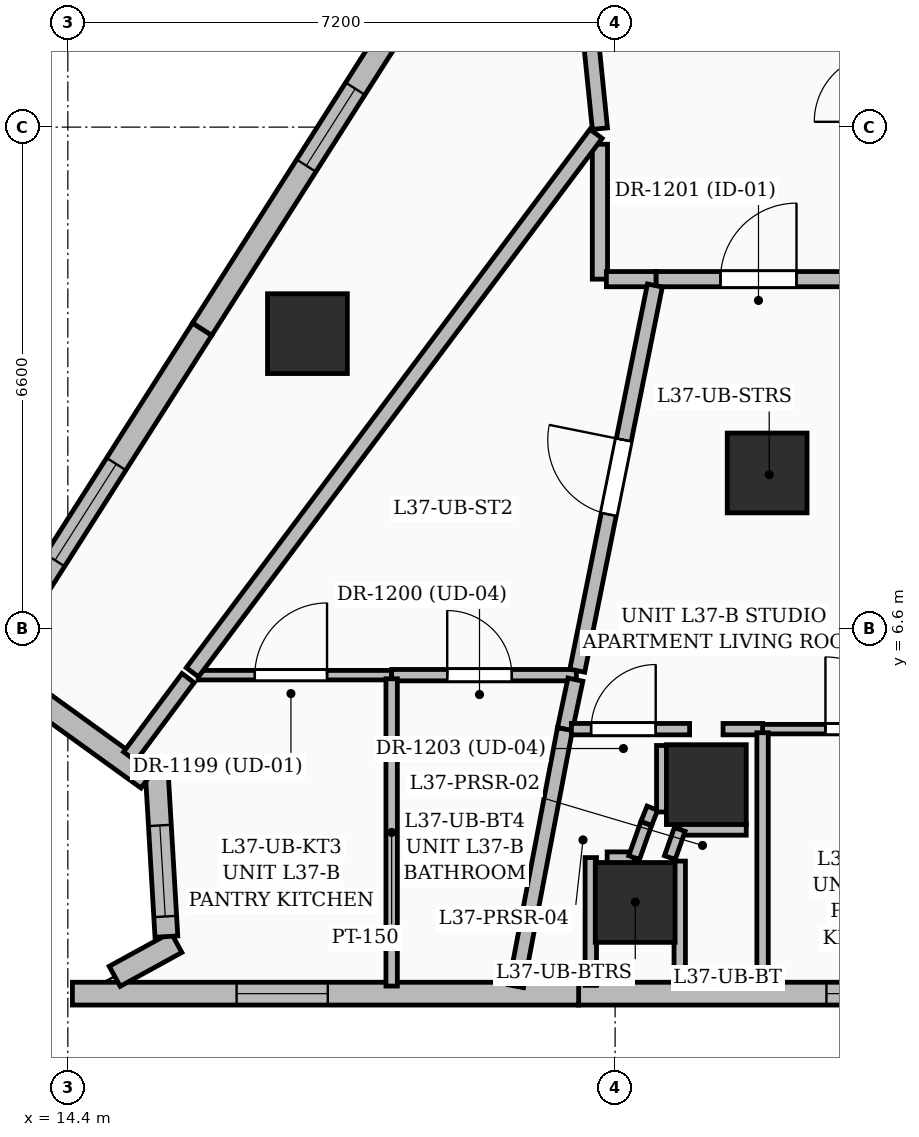
"""IFC4 building model, lengths in metres.
Left out: names, types, materials, properties, quantities, classifications, styles, units other than length and angle.
Written with IfcOpenShell. Run it as: python <this file> out.ifc"""

import sys

from ifc_helpers import new_model, si_unit, direction, frame, frame_2d, origin, origin_2d, place, context, subcontext, project, spatial, rectangle, extrude, element, fill, save


model = new_model("IFC4")
c1 = context("Model", 3, precision=1e-05, world=origin(), true_north=direction((0.0, 1.0)))
c2 = subcontext(c1, "Body", "Model", "MODEL_VIEW")
j1 = project(units=[si_unit("LENGTHUNIT", "METRE"), si_unit("PLANEANGLEUNIT", "RADIAN")], contexts=[c1])
p1 = place(None, origin())
s1 = spatial("IfcSite", under=j1, at=p1, CompositionType="ELEMENT")
p2 = place(p1, origin())
s2 = spatial("IfcBuilding", under=s1, at=p2, CompositionType="ELEMENT")
p3 = place(p2, frame((0.0, 0.0, 146.4)))
s3 = spatial("IfcBuildingStorey", under=s2, at=p3, CompositionType="ELEMENT", Elevation=146.4)
for number, where, z_axis, x_axis in (
    (1, (22.8, 4.55, 0.0), (0.0, 0.0, 1.0), (1.0, 0.0, 0.0)),
    (2, (23.6, 8.65, 0.0), (0.0, 0.0, 1.0), (1.0, 0.0, 0.0)),
    (3, (21.864, 3.0, 0.0), (0.0, 0.0, 1.0), (1.0, 0.0, 0.0)),
    (4, (17.552, 10.483, 0.0), (0.0, 0.0, 1.0), (1.0, 0.0, 0.0)),
):
    element("IfcColumn", number, at=place(p3, frame(where, z_axis=z_axis, x_axis=x_axis)), inside=s3, PredefinedType="COLUMN", context=c2, shape_type="SweptSolid", body=[
        extrude(rectangle(XDim=1.05, YDim=1.05, at=origin_2d()), origin(), (0.0, 0.0, 1.0), 3.6),
    ])
p4 = place(p3, frame((27.78, 1.8, 0.0), z_axis=(0.0, 0.0, 1.0), x_axis=(-1.0, 0.0, 0.0)))
e5 = element("IfcWall", 5, at=p4, inside=s3, PredefinedType="SOLIDWALL", context=c2, shape_type="SweptSolid", body=[
    extrude(rectangle(XDim=6.66, YDim=0.3, at=frame_2d((3.33, 0.0))), origin(), (0.0, 0.0, 1.0), 3.35),
])
p5 = place(p4, frame((1.9, 0.0, 0.6)))
e6 = element("IfcOpeningElement", 6, at=p5, cuts=e5, PredefinedType="OPENING", context=c2, shape_type="SweptSolid", body=[
    extrude(rectangle(XDim=1.5, YDim=2.1, at=frame_2d((0.75, 1.05))), frame((0.0, 0.16, 0.0), z_axis=(0.0, -1.0, 0.0), x_axis=(1.0, 0.0, 0.0)), (0.0, 0.0, 1.0), 0.32),
])
p6 = place(p3, frame((21.12, 1.8, 0.0), z_axis=(0.0, 0.0, 1.0), x_axis=(-1.0, 0.0, 0.0)))
e7 = element("IfcWall", 7, at=p6, inside=s3, PredefinedType="SOLIDWALL", context=c2, shape_type="SweptSolid", body=[
    extrude(rectangle(XDim=6.66, YDim=0.3, at=frame_2d((3.33, 0.0))), origin(), (0.0, 0.0, 1.0), 3.35),
])
p7 = place(p6, frame((3.3, 0.0, 0.8)))
e8 = element("IfcOpeningElement", 8, at=p7, cuts=e7, PredefinedType="OPENING", context=c2, shape_type="SweptSolid", body=[
    extrude(rectangle(XDim=1.2, YDim=1.8, at=frame_2d((0.6, 0.9))), frame((0.0, 0.16, 0.0), z_axis=(0.0, -1.0, 0.0), x_axis=(1.0, 0.0, 0.0)), (0.0, 0.0, 1.0), 0.32),
])
p8 = place(p3, frame((15.016, 2.028, 0.0), z_axis=(0.0, 0.0, 1.0), x_axis=(0.876794471231, 0.48086531921, 0.0)))
e9 = element("IfcWall", 9, at=p8, inside=s3, PredefinedType="SOLIDWALL", context=c2, shape_type="SweptSolid", body=[
    extrude(rectangle(XDim=0.926, YDim=0.3, at=frame_2d((0.463, 0.0))), origin(), (0.0, 0.0, 1.0), 3.35),
])
p9 = place(p3, frame((15.697, 2.551, 0.0), z_axis=(0.0, 0.0, 1.0), x_axis=(-0.058688358982, 0.99827635278, 0.0)))
e10 = element("IfcWall", 10, at=p9, inside=s3, PredefinedType="SOLIDWALL", context=c2, shape_type="SweptSolid", body=[
    extrude(rectangle(XDim=2.126, YDim=0.3, at=frame_2d((1.063, 0.0))), origin(), (0.0, 0.0, 1.0), 3.35),
])
p10 = place(p9, frame((0.265, 0.0, 0.8)))
e11 = element("IfcOpeningElement", 11, at=p10, cuts=e10, PredefinedType="OPENING", context=c2, shape_type="SweptSolid", body=[
    extrude(rectangle(XDim=1.2, YDim=1.8, at=frame_2d((0.6, 0.9))), frame((0.0, 0.16, 0.0), z_axis=(0.0, -1.0, 0.0), x_axis=(1.0, 0.0, 0.0)), (0.0, 0.0, 1.0), 0.32),
])
p11 = place(p3, frame((15.45, 4.627, 0.0), z_axis=(0.0, 0.0, 1.0), x_axis=(-0.810712787228, 0.585444084969, 0.0)))
e12 = element("IfcWall", 12, at=p11, inside=s3, PredefinedType="SOLIDWALL", context=c2, shape_type="SweptSolid", body=[
    extrude(rectangle(XDim=2.11, YDim=0.3, at=frame_2d((1.055, 0.0))), origin(), (0.0, 0.0, 1.0), 3.35),
])
p12 = place(p3, frame((13.007, 5.579, 0.0), z_axis=(0.0, 0.0, 1.0), x_axis=(0.537103674191, 0.843516237645, 0.0)))
e13 = element("IfcWall", 13, at=p12, inside=s3, PredefinedType="SOLIDWALL", context=c2, shape_type="SweptSolid", body=[
    extrude(rectangle(XDim=5.884, YDim=0.3, at=frame_2d((2.942, 0.0))), origin(), (0.0, 0.0, 1.0), 3.35),
])
p13 = place(p12, frame((2.28, 0.0, 0.6)))
e14 = element("IfcOpeningElement", 14, at=p13, cuts=e13, PredefinedType="OPENING", context=c2, shape_type="SweptSolid", body=[
    extrude(rectangle(XDim=1.5, YDim=2.1, at=frame_2d((0.75, 1.05))), frame((0.0, 0.16, 0.0), z_axis=(0.0, -1.0, 0.0), x_axis=(1.0, 0.0, 0.0)), (0.0, 0.0, 1.0), 0.32),
])
p14 = place(p3, frame((16.167, 10.542, 0.0), z_axis=(0.0, 0.0, 1.0), x_axis=(0.537089204025, 0.843525451258, 0.0)))
e15 = element("IfcWall", 15, at=p14, inside=s3, PredefinedType="SOLIDWALL", context=c2, shape_type="SweptSolid", body=[
    extrude(rectangle(XDim=6.504, YDim=0.3, at=frame_2d((3.252, 0.0))), origin(), (0.0, 0.0, 1.0), 3.35),
])
p15 = place(p14, frame((2.55, 0.0, 0.8)))
e16 = element("IfcOpeningElement", 16, at=p15, cuts=e15, PredefinedType="OPENING", context=c2, shape_type="SweptSolid", body=[
    extrude(rectangle(XDim=1.2, YDim=1.8, at=frame_2d((0.6, 0.9))), frame((0.0, 0.16, 0.0), z_axis=(0.0, -1.0, 0.0), x_axis=(1.0, 0.0, 0.0)), (0.0, 0.0, 1.0), 0.32),
])
p16 = place(p3, frame((21.4, 12.975, 0.0), z_axis=(0.0, 0.0, 1.0), x_axis=(0.0, -1.0, 0.0)))
e17 = element("IfcWall", 17, at=p16, inside=s3, PredefinedType="PARTITIONING", context=c2, shape_type="SweptSolid", body=[
    extrude(rectangle(XDim=1.775, YDim=0.2, at=frame_2d((0.888, 0.0))), origin(), (0.0, 0.0, 1.0), 3.35),
])
p17 = place(p3, frame((21.485, 11.2, 0.0), z_axis=(0.0, 0.0, 1.0), x_axis=(1.0, 0.0, 0.0)))
e18 = element("IfcWall", 18, at=p17, inside=s3, PredefinedType="PARTITIONING", context=c2, shape_type="SweptSolid", body=[
    extrude(rectangle(XDim=0.655, YDim=0.2, at=frame_2d((0.327, 0.0))), origin(), (0.0, 0.0, 1.0), 2.787),
])
p18 = place(p3, frame((22.14, 11.2, 0.0), z_axis=(0.0, 0.0, 1.0), x_axis=(1.0, 0.0, 0.0)))
e19 = element("IfcWall", 19, at=p18, inside=s3, PredefinedType="PARTITIONING", context=c2, shape_type="SweptSolid", body=[
    extrude(rectangle(XDim=2.729, YDim=0.2, at=frame_2d((1.365, 0.0))), origin(), (0.0, 0.0, 1.0), 3.35),
])
p19 = place(p18, frame((0.846, 0.0, 0.0)))
e20 = element("IfcOpeningElement", 20, at=p19, cuts=e19, PredefinedType="OPENING", context=c2, shape_type="SweptSolid", body=[
    extrude(rectangle(XDim=1.0, YDim=2.2, at=frame_2d((0.5, 1.1))), frame((0.0, 0.11, 0.0), z_axis=(0.0, -1.0, 0.0), x_axis=(1.0, 0.0, 0.0)), (0.0, 0.0, 1.0), 0.22),
])
p20 = place(p3, frame((20.938, 17.744, 0.0), z_axis=(0.0, 0.0, 1.0), x_axis=(0.100694538304, -0.994917388508, 0.0)))
e21 = element("IfcWall", 21, at=p20, inside=s3, PredefinedType="PARTITIONING", context=c2, shape_type="SweptSolid", body=[
    extrude(rectangle(XDim=4.587, YDim=0.2, at=frame_2d((2.293, 0.0))), origin(), (0.0, 0.0, 1.0), 2.57),
])
p21 = place(p3, frame((16.115, 5.99, 0.0), z_axis=(0.0, 0.0, 1.0), x_axis=(1.0, 0.0, 0.0)))
e22 = element("IfcWall", 22, at=p21, inside=s3, PredefinedType="PARTITIONING", context=c2, shape_type="SweptSolid", body=[
    extrude(rectangle(XDim=2.545, YDim=0.125, at=frame_2d((1.272, 0.0))), origin(), (0.0, 0.0, 1.0), 3.35),
])
p22 = place(p21, frame((0.745, 0.0, 0.0)))
e23 = element("IfcOpeningElement", 23, at=p22, cuts=e22, PredefinedType="OPENING", context=c2, shape_type="SweptSolid", body=[
    extrude(rectangle(XDim=0.95, YDim=2.2, at=frame_2d((0.475, 1.1))), frame((0.0, 0.072, 0.0), z_axis=(0.0, -1.0, 0.0), x_axis=(1.0, 0.0, 0.0)), (0.0, 0.0, 1.0), 0.145),
])
p23 = place(p3, frame((18.66, 5.99, 0.0), z_axis=(0.0, 0.0, 1.0), x_axis=(1.0, 0.0, 0.0)))
e24 = element("IfcWall", 24, at=p23, inside=s3, PredefinedType="PARTITIONING", context=c2, shape_type="SweptSolid", body=[
    extrude(rectangle(XDim=2.43, YDim=0.15, at=frame_2d((1.215, 0.0))), origin(), (0.0, 0.0, 1.0), 2.57),
])
p24 = place(p23, frame((0.731, 0.0, 0.0)))
e25 = element("IfcOpeningElement", 25, at=p24, cuts=e24, PredefinedType="OPENING", context=c2, shape_type="SweptSolid", body=[
    extrude(rectangle(XDim=0.85, YDim=2.1, at=frame_2d((0.425, 1.05))), frame((0.0, 0.085, 0.0), z_axis=(0.0, -1.0, 0.0), x_axis=(1.0, 0.0, 0.0)), (0.0, 0.0, 1.0), 0.17),
])
p25 = place(p3, frame((21.102, 6.049, 0.0), z_axis=(0.0, 0.0, 1.0), x_axis=(0.197587137943, 0.9802853273, 0.0)))
e26 = element("IfcWall", 26, at=p25, inside=s3, PredefinedType="PARTITIONING", context=c2, shape_type="SweptSolid", body=[
    extrude(rectangle(XDim=5.17, YDim=0.2, at=frame_2d((2.585, 0.0))), origin(), (0.0, 0.0, 1.0), 2.393),
])
p26 = place(p25, frame((2.097, 0.0, 0.0)))
e27 = element("IfcOpeningElement", 27, at=p26, cuts=e26, PredefinedType="OPENING", context=c2, shape_type="SweptSolid", body=[
    extrude(rectangle(XDim=1.0, YDim=2.2, at=frame_2d((0.5, 1.1))), frame((0.0, 0.11, 0.0), z_axis=(0.0, -1.0, 0.0), x_axis=(1.0, 0.0, 0.0)), (0.0, 0.0, 1.0), 0.22),
])
p27 = place(p3, frame((21.349, 13.112, 0.0), z_axis=(0.0, 0.0, 1.0), x_axis=(-0.599823501839, -0.800132343204, 0.0)))
e28 = element("IfcWall", 28, at=p27, inside=s3, PredefinedType="PARTITIONING", context=c2, shape_type="SweptSolid", body=[
    extrude(rectangle(XDim=8.854, YDim=0.2, at=frame_2d((4.427, 0.0))), origin(), (0.0, 0.0, 1.0), 2.393),
])
p28 = place(p3, frame((18.66, 1.9, 0.0), z_axis=(0.0, 0.0, 1.0), x_axis=(0.0, 1.0, 0.0)))
e29 = element("IfcWall", 29, at=p28, inside=s3, PredefinedType="PARTITIONING", context=c2, shape_type="SweptSolid", body=[
    extrude(rectangle(XDim=4.042, YDim=0.15, at=frame_2d((2.021, 0.0))), origin(), (0.0, 0.0, 1.0), 3.35),
])
p29 = place(p3, frame((15.982, 5.952, 0.0), z_axis=(0.0, 0.0, 1.0), x_axis=(-0.597169955074, -0.802114732913, 0.0)))
e30 = element("IfcWall", 30, at=p29, inside=s3, PredefinedType="PARTITIONING", context=c2, shape_type="SweptSolid", body=[
    extrude(rectangle(XDim=1.285, YDim=0.2, at=frame_2d((0.643, 0.0))), origin(), (0.0, 0.0, 1.0), 3.35),
])
p30 = place(p3, frame((20.94, 5.28, 0.0), z_axis=(0.0, 0.0, 1.0), x_axis=(0.206823588426, 0.978378251634, 0.0)))
e31 = element("IfcWall", 31, at=p30, inside=s3, PredefinedType="PARTITIONING", context=c2, shape_type="SweptSolid", body=[
    extrude(rectangle(XDim=0.666, YDim=0.2, at=frame_2d((0.333, 0.0))), origin(), (0.0, 0.0, 1.0), 3.35),
])
p31 = place(p3, frame((20.296, 1.898, 0.0), z_axis=(0.0, 0.0, 1.0), x_axis=(0.187066487998, 0.982347254828, 0.0)))
e32 = element("IfcWall", 32, at=p31, inside=s3, PredefinedType="PARTITIONING", context=c2, shape_type="SweptSolid", body=[
    extrude(rectangle(XDim=3.443, YDim=0.2, at=frame_2d((1.721, 0.0))), origin(), (0.0, 0.0, 1.0), 2.57),
])
p32 = place(p3, frame((23.54, 5.28, 0.0), z_axis=(0.0, 0.0, 1.0), x_axis=(1.0, 0.0, 0.0)))
e33 = element("IfcWall", 33, at=p32, inside=s3, PredefinedType="PARTITIONING", context=c2, shape_type="SweptSolid", body=[
    extrude(rectangle(XDim=3.635, YDim=0.125, at=frame_2d((1.817, 0.0))), origin(), (0.0, 0.0, 1.0), 3.35),
])
p33 = place(p32, frame((0.827, 0.0, 0.0)))
e34 = element("IfcOpeningElement", 34, at=p33, cuts=e33, PredefinedType="OPENING", context=c2, shape_type="SweptSolid", body=[
    extrude(rectangle(XDim=0.95, YDim=2.2, at=frame_2d((0.475, 1.1))), frame((0.0, 0.072, 0.0), z_axis=(0.0, -1.0, 0.0), x_axis=(1.0, 0.0, 0.0)), (0.0, 0.0, 1.0), 0.145),
])
p34 = place(p3, frame((21.025, 5.28, 0.0), z_axis=(0.0, 0.0, 1.0), x_axis=(1.0, 0.0, 0.0)))
e35 = element("IfcWall", 35, at=p34, inside=s3, PredefinedType="PARTITIONING", context=c2, shape_type="SweptSolid", body=[
    extrude(rectangle(XDim=1.555, YDim=0.15, at=frame_2d((0.778, 0.0))), origin(), (0.0, 0.0, 1.0), 3.35),
])
p35 = place(p34, frame((0.259, 0.0, 0.0)))
e36 = element("IfcOpeningElement", 36, at=p35, cuts=e35, PredefinedType="OPENING", context=c2, shape_type="SweptSolid", body=[
    extrude(rectangle(XDim=0.85, YDim=2.1, at=frame_2d((0.425, 1.05))), frame((0.0, 0.085, 0.0), z_axis=(0.0, -1.0, 0.0), x_axis=(1.0, 0.0, 0.0)), (0.0, 0.0, 1.0), 0.17),
])
p36 = place(p3, frame((23.02, 5.28, 0.0), z_axis=(0.0, 0.0, 1.0), x_axis=(1.0, 0.0, 0.0)))
e37 = element("IfcWall", 37, at=p36, inside=s3, PredefinedType="PARTITIONING", context=c2, shape_type="SweptSolid", body=[
    extrude(rectangle(XDim=0.52, YDim=0.15, at=frame_2d((0.26, 0.0))), origin(), (0.0, 0.0, 1.0), 3.35),
])
p37 = place(p3, frame((23.54, 5.232, 0.0), z_axis=(0.0, 0.0, 1.0), x_axis=(0.0, -1.0, 0.0)))
e38 = element("IfcWall", 38, at=p37, inside=s3, PredefinedType="PARTITIONING", context=c2, shape_type="SweptSolid", body=[
    extrude(rectangle(XDim=3.333, YDim=0.15, at=frame_2d((1.666, 0.0))), origin(), (0.0, 0.0, 1.0), 2.436),
])
p38 = place(p3, frame((23.325, 3.96, 0.0), z_axis=(0.0, 0.0, 1.0), x_axis=(-1.0, 0.0, 0.0)))
e39 = element("IfcWall", 39, at=p38, inside=s3, PredefinedType="PARTITIONING", context=c2, shape_type="SweptSolid", body=[
    extrude(rectangle(XDim=0.875, YDim=0.15, at=frame_2d((0.438, 0.0))), origin(), (0.0, 0.0, 1.0), 3.35),
])
p39 = place(p3, frame((22.45, 3.96, 0.0), z_axis=(0.0, 0.0, 1.0), x_axis=(-0.331321182958, -0.943518030418, 0.0)))
e40 = element("IfcWall", 40, at=p39, inside=s3, PredefinedType="PARTITIONING", context=c2, shape_type="SweptSolid", body=[
    extrude(rectangle(XDim=0.392, YDim=0.15, at=frame_2d((0.196, 0.0))), origin(), (0.0, 0.0, 1.0), 3.35),
])
p40 = place(p3, frame((22.45, 3.544, 0.0), z_axis=(0.0, 0.0, 1.0), x_axis=(0.0, -1.0, 0.0)))
e41 = element("IfcWall", 41, at=p40, inside=s3, PredefinedType="PARTITIONING", context=c2, shape_type="SweptSolid", body=[
    extrude(rectangle(XDim=1.635, YDim=0.15, at=frame_2d((0.817, 0.0))), origin(), (0.0, 0.0, 1.0), 2.57),
])
p41 = place(p3, frame((21.28, 1.909, 0.0), z_axis=(0.0, 0.0, 1.0), x_axis=(0.0, 1.0, 0.0)))
e42 = element("IfcWall", 42, at=p41, inside=s3, PredefinedType="PARTITIONING", context=c2, shape_type="SweptSolid", body=[
    extrude(rectangle(XDim=1.681, YDim=0.15, at=frame_2d((0.841, 0.0))), origin(), (0.0, 0.0, 1.0), 2.57),
])
p42 = place(p3, frame((21.495, 3.59, 0.0), z_axis=(0.0, 0.0, 1.0), x_axis=(1.0, 0.0, 0.0)))
e43 = element("IfcWall", 43, at=p42, inside=s3, PredefinedType="PARTITIONING", context=c2, shape_type="SweptSolid", body=[
    extrude(rectangle(XDim=0.355, YDim=0.15, at=frame_2d((0.177, 0.0))), origin(), (0.0, 0.0, 1.0), 2.57),
])
p43 = place(p3, frame((21.85, 3.59, 0.0), z_axis=(0.0, 0.0, 1.0), x_axis=(0.334878542098, 0.942261302422, 0.0)))
e44 = element("IfcWall", 44, at=p43, inside=s3, PredefinedType="PARTITIONING", context=c2, shape_type="SweptSolid", body=[
    extrude(rectangle(XDim=0.478, YDim=0.15, at=frame_2d((0.239, 0.0))), origin(), (0.0, 0.0, 1.0), 3.35),
])
p44 = place(p3, frame((22.01, 4.04, 0.0), z_axis=(0.0, 0.0, 1.0), x_axis=(0.371781498681, 0.928320266524, 0.0)))
e45 = element("IfcWall", 45, at=p44, inside=s3, PredefinedType="PARTITIONING", context=c2, shape_type="SweptSolid", body=[
    extrude(rectangle(XDim=0.215, YDim=0.15, at=frame_2d((0.108, 0.0))), origin(), (0.0, 0.0, 1.0), 3.35),
])
p45 = place(p3, frame((22.22, 4.19, 0.0), z_axis=(0.0, 0.0, 1.0), x_axis=(0.0, 1.0, 0.0)))
e46 = element("IfcWall", 46, at=p45, inside=s3, PredefinedType="PARTITIONING", context=c2, shape_type="SweptSolid", body=[
    extrude(rectangle(XDim=0.875, YDim=0.15, at=frame_2d((0.438, 0.0))), origin(), (0.0, 0.0, 1.0), 3.35),
])
p46 = place(p5, origin())
e47 = element("IfcWindow", 47, at=p46, inside=s3, PartitioningType="SINGLE_PANEL", PredefinedType="WINDOW", context=c2, shape_type="SweptSolid", body=[
    extrude(rectangle(XDim=1.5, YDim=2.1, at=frame_2d((0.75, 1.05))), frame((0.0, 0.03, 0.0), z_axis=(0.0, -1.0, 0.0), x_axis=(1.0, 0.0, 0.0)), (0.0, 0.0, 1.0), 0.06),
])
fill(e6, e47)
p47 = place(p7, origin())
e48 = element("IfcWindow", 48, at=p47, inside=s3, PartitioningType="SINGLE_PANEL", PredefinedType="WINDOW", context=c2, shape_type="SweptSolid", body=[
    extrude(rectangle(XDim=1.2, YDim=1.8, at=frame_2d((0.6, 0.9))), frame((0.0, 0.03, 0.0), z_axis=(0.0, -1.0, 0.0), x_axis=(1.0, 0.0, 0.0)), (0.0, 0.0, 1.0), 0.06),
])
fill(e8, e48)
p48 = place(p10, origin())
e49 = element("IfcWindow", 49, at=p48, inside=s3, PartitioningType="SINGLE_PANEL", PredefinedType="WINDOW", context=c2, shape_type="SweptSolid", body=[
    extrude(rectangle(XDim=1.2, YDim=1.8, at=frame_2d((0.6, 0.9))), frame((0.0, 0.03, 0.0), z_axis=(0.0, -1.0, 0.0), x_axis=(1.0, 0.0, 0.0)), (0.0, 0.0, 1.0), 0.06),
])
fill(e11, e49)
p49 = place(p13, origin())
e50 = element("IfcWindow", 50, at=p49, inside=s3, PartitioningType="SINGLE_PANEL", PredefinedType="WINDOW", context=c2, shape_type="SweptSolid", body=[
    extrude(rectangle(XDim=1.5, YDim=2.1, at=frame_2d((0.75, 1.05))), frame((0.0, 0.03, 0.0), z_axis=(0.0, -1.0, 0.0), x_axis=(1.0, 0.0, 0.0)), (0.0, 0.0, 1.0), 0.06),
])
fill(e14, e50)
p50 = place(p15, origin())
e51 = element("IfcWindow", 51, at=p50, inside=s3, PartitioningType="SINGLE_PANEL", PredefinedType="WINDOW", context=c2, shape_type="SweptSolid", body=[
    extrude(rectangle(XDim=1.2, YDim=1.8, at=frame_2d((0.6, 0.9))), frame((0.0, 0.03, 0.0), z_axis=(0.0, -1.0, 0.0), x_axis=(1.0, 0.0, 0.0)), (0.0, 0.0, 1.0), 0.06),
])
fill(e16, e51)
p51 = place(p22, origin())
e52 = element("IfcDoor", 52, at=p51, inside=s3, OperationType="SINGLE_SWING_RIGHT", PredefinedType="DOOR", context=c2, shape_type="SweptSolid", body=[
    extrude(rectangle(XDim=0.95, YDim=2.2, at=frame_2d((0.475, 1.1))), frame((0.0, 0.025, 0.0), z_axis=(0.0, -1.0, 0.0), x_axis=(1.0, 0.0, 0.0)), (0.0, 0.0, 1.0), 0.05),
])
fill(e23, e52)
p52 = place(p24, origin())
e53 = element("IfcDoor", 53, at=p52, inside=s3, OperationType="SINGLE_SWING_LEFT", PredefinedType="DOOR", context=c2, shape_type="SweptSolid", body=[
    extrude(rectangle(XDim=0.85, YDim=2.1, at=frame_2d((0.425, 1.05))), frame((0.0, 0.025, 0.0), z_axis=(0.0, -1.0, 0.0), x_axis=(1.0, 0.0, 0.0)), (0.0, 0.0, 1.0), 0.05),
])
fill(e25, e53)
p53 = place(p19, origin())
e54 = element("IfcDoor", 54, at=p53, inside=s3, OperationType="SINGLE_SWING_RIGHT", PredefinedType="DOOR", context=c2, shape_type="SweptSolid", body=[
    extrude(rectangle(XDim=1.0, YDim=2.2, at=frame_2d((0.5, 1.1))), frame((0.0, 0.025, 0.0), z_axis=(0.0, -1.0, 0.0), x_axis=(1.0, 0.0, 0.0)), (0.0, 0.0, 1.0), 0.05),
])
fill(e20, e54)
p54 = place(p33, origin())
e55 = element("IfcDoor", 55, at=p54, inside=s3, OperationType="SINGLE_SWING_LEFT", PredefinedType="DOOR", context=c2, shape_type="SweptSolid", body=[
    extrude(rectangle(XDim=0.95, YDim=2.2, at=frame_2d((0.475, 1.1))), frame((0.0, 0.025, 0.0), z_axis=(0.0, -1.0, 0.0), x_axis=(1.0, 0.0, 0.0)), (0.0, 0.0, 1.0), 0.05),
])
fill(e34, e55)
p55 = place(p35, origin())
e56 = element("IfcDoor", 56, at=p55, inside=s3, OperationType="SINGLE_SWING_RIGHT", PredefinedType="DOOR", context=c2, shape_type="SweptSolid", body=[
    extrude(rectangle(XDim=0.85, YDim=2.1, at=frame_2d((0.425, 1.05))), frame((0.0, 0.025, 0.0), z_axis=(0.0, -1.0, 0.0), x_axis=(1.0, 0.0, 0.0)), (0.0, 0.0, 1.0), 0.05),
])
fill(e36, e56)
p56 = place(p26, origin())
e57 = element("IfcDoor", 57, at=p56, inside=s3, OperationType="SINGLE_SWING_RIGHT", PredefinedType="DOOR", context=c2, shape_type="SweptSolid", body=[
    extrude(rectangle(XDim=1.0, YDim=2.2, at=frame_2d((0.5, 1.1))), frame((0.0, 0.025, 0.0), z_axis=(0.0, -1.0, 0.0), x_axis=(1.0, 0.0, 0.0)), (0.0, 0.0, 1.0), 0.05),
])
fill(e27, e57)
save(model, sys.argv[1])
